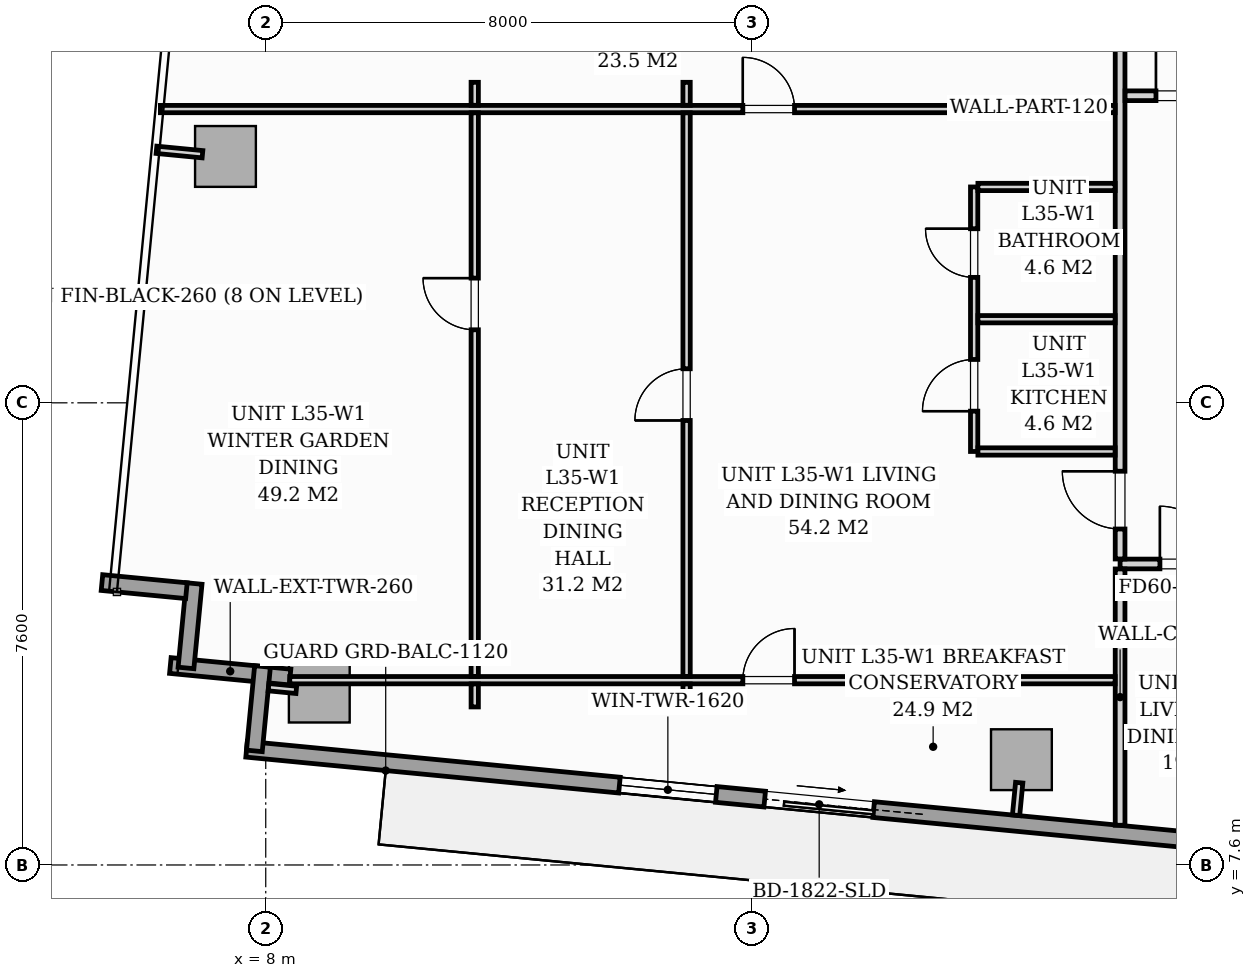
"""IFC4 building model, lengths in metres.
Left out: names, types, materials, properties, quantities, classifications, styles, units other than length and angle.
Written with IfcOpenShell. Run it as: python <this file> out.ifc"""

import sys

from ifc_helpers import new_model, si_unit, direction, frame, frame_2d, origin, origin_2d, place, context, subcontext, project, spatial, rectangle, extrude, source, transform, mapped, element, fill, save


model = new_model("IFC4")
c1 = context("Model", 3, precision=1e-05, world=origin(), true_north=direction((0.0, 1.0)))
c2 = subcontext(c1, "Body", "Model", "MODEL_VIEW")
j1 = project(units=[si_unit("LENGTHUNIT", "METRE"), si_unit("PLANEANGLEUNIT", "RADIAN")], contexts=[c1])
p1 = place(None, origin())
s1 = spatial("IfcSite", under=j1, at=p1, CompositionType="ELEMENT")
p2 = place(p1, origin())
s2 = spatial("IfcBuilding", under=s1, at=p2, CompositionType="ELEMENT")
p3 = place(p2, frame((0.0, 0.0, 124.6)))
s3 = spatial("IfcBuildingStorey", under=s2, at=p3, CompositionType="ELEMENT", Elevation=124.6)
m1 = source(origin(), c2, "Body", "SweptSolid", [
    extrude(rectangle(XDim=1.0, YDim=1.0, at=origin_2d()), origin(), (0.0, 0.0, 1.0), 3.194),
])
for number, where, z_axis, x_axis in (
    (1, (8.881, 10.443, 0.004), (0.0, 0.0, 1.0), (0.995, -0.096, 0.0)),
    (2, (20.427, 9.332, 0.004), (0.0, 0.0, 1.0), (0.995, -0.096, 0.0)),
    (3, (7.338, 19.252, 0.004), (0.0, 0.0, 1.0), (0.995, -0.096, 0.0)),
):
    element("IfcColumn", number, at=place(p3, frame(where, z_axis=z_axis, x_axis=x_axis)), inside=s3, PredefinedType="COLUMN", context=c2, shape_type="MappedRepresentation", body=[
        mapped(m1, transform((0.0, 0.0, 0.0), scale=1.0)),
    ])
p4 = place(p3, frame((8.4, 10.69, 0.0), z_axis=(0.0, 0.0, 1.0), x_axis=(-0.995391147587, 0.095898192396, 0.0)))
e4 = element("IfcWall", 4, at=p4, inside=s3, PredefinedType="STANDARD", context=c2, shape_type="SweptSolid", body=[
    extrude(rectangle(XDim=1.978, YDim=0.26, at=frame_2d((0.989, 0.0))), origin(), (0.0, 0.0, 1.0), 2.94),
])
p5 = place(p3, frame((6.688, 10.84, 0.0), z_axis=(0.0, 0.0, 1.0), x_axis=(0.09589913835, 0.995391056452, 0.0)))
e5 = element("IfcWall", 5, at=p5, inside=s3, PredefinedType="STANDARD", context=c2, shape_type="SweptSolid", body=[
    extrude(rectangle(XDim=1.395, YDim=0.26, at=frame_2d((0.698, 0.0))), origin(), (0.0, 0.0, 1.0), 2.94),
])
p6 = place(p3, frame((6.695, 12.111, 0.0), z_axis=(0.0, 0.0, 1.0), x_axis=(-0.99540614245, 0.095742423056, 0.0)))
e6 = element("IfcWall", 6, at=p6, inside=s3, PredefinedType="STANDARD", context=c2, shape_type="SweptSolid", body=[
    extrude(rectangle(XDim=1.395, YDim=0.26, at=frame_2d((0.697, 0.0))), origin(), (0.0, 0.0, 1.0), 2.94),
])
p7 = place(p3, frame((24.617, 7.873, 0.0), z_axis=(0.0, 0.0, 1.0), x_axis=(-0.995395976631, 0.095848055311, 0.0)))
e7 = element("IfcWall", 7, at=p7, inside=s3, PredefinedType="STANDARD", context=c2, shape_type="SweptSolid", body=[
    extrude(rectangle(XDim=17.01, YDim=0.26, at=frame_2d((8.505, 0.0))), origin(), (0.0, 0.0, 1.0), 2.94),
])
p8 = place(p7, frame((6.65, 0.0, 0.0)))
e8 = element("IfcOpeningElement", 8, at=p8, cuts=e7, PredefinedType="OPENING", context=c2, shape_type="SweptSolid", body=[
    extrude(rectangle(XDim=1.8, YDim=2.06, at=frame_2d((0.9, 1.03))), frame((0.0, 0.14, 0.0), z_axis=(0.0, -1.0, 0.0), x_axis=(1.0, 0.0, 0.0)), (0.0, 0.0, 1.0), 0.28),
])
p9 = place(p7, frame((9.25, 0.0, 0.65)))
e9 = element("IfcOpeningElement", 9, at=p9, cuts=e7, PredefinedType="OPENING", context=c2, shape_type="SweptSolid", body=[
    extrude(rectangle(XDim=1.6, YDim=1.5, at=frame_2d((0.8, 0.75))), frame((0.0, 0.14, 0.0), z_axis=(0.0, -1.0, 0.0), x_axis=(1.0, 0.0, 0.0)), (0.0, 0.0, 1.0), 0.28),
])
p10 = place(p3, frame((7.813, 9.476, 0.0), z_axis=(0.0, 0.0, 1.0), x_axis=(0.095915846097, 0.995389446633, 0.0)))
e10 = element("IfcWall", 10, at=p10, inside=s3, PredefinedType="STANDARD", context=c2, shape_type="SweptSolid", body=[
    extrude(rectangle(XDim=1.395, YDim=0.26, at=frame_2d((0.697, 0.0))), origin(), (0.0, 0.0, 1.0), 2.94),
])
p11 = place(p3, frame((22.05, 12.55, 0.0), z_axis=(0.0, 0.0, 1.0), x_axis=(1.0, 0.0, 0.0)))
e11 = element("IfcWall", 11, at=p11, inside=s3, PredefinedType="PARTITIONING", context=c2, shape_type="SweptSolid", body=[
    extrude(rectangle(XDim=23.83, YDim=0.16, at=frame_2d((11.915, 0.0))), origin(), (0.0, 0.0, 1.0), 2.94),
])
p12 = place(p11, frame((0.655, 0.0, 0.0)))
e12 = element("IfcOpeningElement", 12, at=p12, cuts=e11, PredefinedType="OPENING", context=c2, shape_type="SweptSolid", body=[
    extrude(rectangle(XDim=0.95, YDim=2.06, at=frame_2d((0.475, 1.03))), frame((0.0, 0.09, 0.0), z_axis=(0.0, -1.0, 0.0), x_axis=(1.0, 0.0, 0.0)), (0.0, 0.0, 1.0), 0.18),
])
p13 = place(p11, frame((12.04, 0.0, 0.0)))
e13 = element("IfcOpeningElement", 13, at=p13, cuts=e11, PredefinedType="OPENING", context=c2, shape_type="SweptSolid", body=[
    extrude(rectangle(XDim=0.95, YDim=2.06, at=frame_2d((0.475, 1.03))), frame((0.0, 0.09, 0.0), z_axis=(0.0, -1.0, 0.0), x_axis=(1.0, 0.0, 0.0)), (0.0, 0.0, 1.0), 0.18),
])
p14 = place(p3, frame((22.05, 8.253, 0.0), z_axis=(0.0, 0.0, 1.0), x_axis=(0.0, 1.0, 0.0)))
e14 = element("IfcWall", 14, at=p14, inside=s3, PredefinedType="PARTITIONING", context=c2, shape_type="SweptSolid", body=[
    extrude(rectangle(XDim=4.215, YDim=0.16, at=frame_2d((2.107, 0.0))), origin(), (0.0, 0.0, 1.0), 2.94),
])
p15 = place(p3, frame((22.05, 12.632, 0.0), z_axis=(0.0, 0.0, 1.0), x_axis=(0.0, 1.0, 0.0)))
e15 = element("IfcWall", 15, at=p15, inside=s3, PredefinedType="PARTITIONING", context=c2, shape_type="SweptSolid", body=[
    extrude(rectangle(XDim=14.785, YDim=0.16, at=frame_2d((7.393, 0.0))), origin(), (0.0, 0.0, 1.0), 2.94),
])
p16 = place(p15, frame((0.493, 0.0, 0.0)))
e16 = element("IfcOpeningElement", 16, at=p16, cuts=e15, PredefinedType="OPENING", context=c2, shape_type="SweptSolid", body=[
    extrude(rectangle(XDim=0.95, YDim=2.06, at=frame_2d((0.475, 1.03))), frame((0.0, 0.09, 0.0), z_axis=(0.0, -1.0, 0.0), x_axis=(1.0, 0.0, 0.0)), (0.0, 0.0, 1.0), 0.18),
])
p17 = place(p3, frame((19.65, 14.4, 0.0), z_axis=(0.0, 0.0, 1.0), x_axis=(0.0, 1.0, 0.0)))
e17 = element("IfcWall", 17, at=p17, inside=s3, PredefinedType="PARTITIONING", context=c2, shape_type="SweptSolid", body=[
    extrude(rectangle(XDim=4.35, YDim=0.12, at=frame_2d((2.175, 0.0))), origin(), (0.0, 0.0, 1.0), 2.94),
])
p18 = place(p17, frame((0.663, 0.0, 0.0)))
e18 = element("IfcOpeningElement", 18, at=p18, cuts=e17, PredefinedType="OPENING", context=c2, shape_type="SweptSolid", body=[
    extrude(rectangle(XDim=0.85, YDim=2.05, at=frame_2d((0.425, 1.025))), frame((0.0, 0.07, 0.0), z_axis=(0.0, -1.0, 0.0), x_axis=(1.0, 0.0, 0.0)), (0.0, 0.0, 1.0), 0.14),
])
p19 = place(p17, frame((2.863, 0.0, 0.0)))
e19 = element("IfcOpeningElement", 19, at=p19, cuts=e17, PredefinedType="OPENING", context=c2, shape_type="SweptSolid", body=[
    extrude(rectangle(XDim=0.8, YDim=2.02, at=frame_2d((0.4, 1.01))), frame((0.0, 0.07, 0.0), z_axis=(0.0, -1.0, 0.0), x_axis=(1.0, 0.0, 0.0)), (0.0, 0.0, 1.0), 0.14),
])
for number, where, z_axis, x_axis in (
    (20, (19.712, 16.575, 0.0), (0.0, 0.0, 1.0), (1.0, 0.0, 0.0)),
    (21, (19.712, 14.4, 0.0), (0.0, 0.0, 1.0), (1.0, 0.0, 0.0)),
    (22, (19.712, 18.75, 0.0), (0.0, 0.0, 1.0), (1.0, 0.0, 0.0)),
):
    element("IfcWall", number, at=place(p3, frame(where, z_axis=z_axis, x_axis=x_axis)), inside=s3, PredefinedType="PARTITIONING", context=c2, shape_type="SweptSolid", body=[
        extrude(rectangle(XDim=2.256, YDim=0.12, at=frame_2d((1.128, 0.0))), origin(), (0.0, 0.0, 1.0), 2.94),
    ])
p20 = place(p3, frame((8.395, 10.639, 0.0), z_axis=(0.0, 0.0, 1.0), x_axis=(1.0, 0.0, 0.0)))
e23 = element("IfcWall", 23, at=p20, inside=s3, PredefinedType="PARTITIONING", context=c2, shape_type="SweptSolid", body=[
    extrude(rectangle(XDim=13.573, YDim=0.12, at=frame_2d((6.787, 0.0))), origin(), (0.0, 0.0, 1.0), 2.94),
])
p21 = place(p20, frame((7.451, 0.0, 0.0)))
e24 = element("IfcOpeningElement", 24, at=p21, cuts=e23, PredefinedType="OPENING", context=c2, shape_type="SweptSolid", body=[
    extrude(rectangle(XDim=0.85, YDim=2.05, at=frame_2d((0.425, 1.025))), frame((0.0, 0.07, 0.0), z_axis=(0.0, -1.0, 0.0), x_axis=(1.0, 0.0, 0.0)), (0.0, 0.0, 1.0), 0.14),
])
p22 = place(p3, frame((6.268, 20.031, 0.0), z_axis=(0.0, 0.0, 1.0), x_axis=(1.0, 0.0, 0.0)))
e25 = element("IfcWall", 25, at=p22, inside=s3, PredefinedType="PARTITIONING", context=c2, shape_type="SweptSolid", body=[
    extrude(rectangle(XDim=15.7, YDim=0.12, at=frame_2d((7.85, 0.0))), origin(), (0.0, 0.0, 1.0), 2.94),
])
p23 = place(p22, frame((9.579, 0.0, 0.0)))
e26 = element("IfcOpeningElement", 26, at=p23, cuts=e25, PredefinedType="OPENING", context=c2, shape_type="SweptSolid", body=[
    extrude(rectangle(XDim=0.85, YDim=2.05, at=frame_2d((0.425, 1.025))), frame((0.0, 0.07, 0.0), z_axis=(0.0, -1.0, 0.0), x_axis=(1.0, 0.0, 0.0)), (0.0, 0.0, 1.0), 0.14),
])
p24 = place(p3, frame((11.437, 10.199, 0.0), z_axis=(0.0, 0.0, 1.0), x_axis=(0.0, 1.0, 0.0)))
e27 = element("IfcWall", 27, at=p24, inside=s3, PredefinedType="PARTITIONING", context=c2, shape_type="SweptSolid", body=[
    extrude(rectangle(XDim=0.378, YDim=0.12, at=frame_2d((0.189, 0.0))), origin(), (0.0, 0.0, 1.0), 2.94),
])
p25 = place(p3, frame((11.437, 10.701, 0.0), z_axis=(0.0, 0.0, 1.0), x_axis=(0.0, 1.0, 0.0)))
e28 = element("IfcWall", 28, at=p25, inside=s3, PredefinedType="PARTITIONING", context=c2, shape_type="SweptSolid", body=[
    extrude(rectangle(XDim=9.268, YDim=0.12, at=frame_2d((4.634, 0.0))), origin(), (0.0, 0.0, 1.0), 2.94),
])
p26 = place(p25, frame((5.7, 0.0, 0.0)))
e29 = element("IfcOpeningElement", 29, at=p26, cuts=e28, PredefinedType="OPENING", context=c2, shape_type="SweptSolid", body=[
    extrude(rectangle(XDim=0.85, YDim=2.05, at=frame_2d((0.425, 1.025))), frame((0.0, 0.07, 0.0), z_axis=(0.0, -1.0, 0.0), x_axis=(1.0, 0.0, 0.0)), (0.0, 0.0, 1.0), 0.14),
])
for number, where, z_axis, x_axis in (
    (30, (11.437, 20.093, 0.0), (0.0, 0.0, 1.0), (0.0, 1.0, 0.0)),
    (31, (14.921, 10.199, 0.0), (0.0, 0.0, 1.0), (0.0, 1.0, 0.0)),
):
    element("IfcWall", number, at=place(p3, frame(where, z_axis=z_axis, x_axis=x_axis)), inside=s3, PredefinedType="PARTITIONING", context=c2, shape_type="SweptSolid", body=[
        extrude(rectangle(XDim=0.378, YDim=0.12, at=frame_2d((0.189, 0.0))), origin(), (0.0, 0.0, 1.0), 2.94),
    ])
p27 = place(p3, frame((14.921, 10.701, 0.0), z_axis=(0.0, 0.0, 1.0), x_axis=(0.0, 1.0, 0.0)))
e32 = element("IfcWall", 32, at=p27, inside=s3, PredefinedType="PARTITIONING", context=c2, shape_type="SweptSolid", body=[
    extrude(rectangle(XDim=9.268, YDim=0.12, at=frame_2d((4.634, 0.0))), origin(), (0.0, 0.0, 1.0), 2.94),
])
p28 = place(p27, frame((4.209, 0.0, 0.0)))
e33 = element("IfcOpeningElement", 33, at=p28, cuts=e32, PredefinedType="OPENING", context=c2, shape_type="SweptSolid", body=[
    extrude(rectangle(XDim=0.85, YDim=2.05, at=frame_2d((0.425, 1.025))), frame((0.0, 0.07, 0.0), z_axis=(0.0, -1.0, 0.0), x_axis=(1.0, 0.0, 0.0)), (0.0, 0.0, 1.0), 0.14),
])
p29 = place(p3, frame((14.921, 20.093, 0.0), z_axis=(0.0, 0.0, 1.0), x_axis=(0.0, 1.0, 0.0)))
e34 = element("IfcWall", 34, at=p29, inside=s3, PredefinedType="PARTITIONING", context=c2, shape_type="SweptSolid", body=[
    extrude(rectangle(XDim=0.378, YDim=0.12, at=frame_2d((0.189, 0.0))), origin(), (0.0, 0.0, 1.0), 2.94),
])
p30 = place(p3, frame((22.132, 20.25, 0.0), z_axis=(0.0, 0.0, 1.0), x_axis=(1.0, 0.0, 0.0)))
e35 = element("IfcWall", 35, at=p30, inside=s3, PredefinedType="PARTITIONING", context=c2, shape_type="SweptSolid", body=[
    extrude(rectangle(XDim=1.886, YDim=0.16, at=frame_2d((0.943, 0.0))), origin(), (0.0, 0.0, 1.0), 2.94),
])
p31 = place(p30, frame((0.508, 0.0, 0.0)))
e36 = element("IfcOpeningElement", 36, at=p31, cuts=e35, PredefinedType="OPENING", context=c2, shape_type="SweptSolid", body=[
    extrude(rectangle(XDim=0.95, YDim=2.06, at=frame_2d((0.475, 1.03))), frame((0.0, 0.09, 0.0), z_axis=(0.0, -1.0, 0.0), x_axis=(1.0, 0.0, 0.0)), (0.0, 0.0, 1.0), 0.18),
])
p32 = place(p3, frame((8.502, 10.48, 0.0), z_axis=(0.0, 0.0, 1.0), x_axis=(-0.995384576284, 0.09596637586, 0.0)))
e37 = element("IfcWall", 37, at=p32, inside=s3, PredefinedType="PARTITIONING", context=c2, shape_type="SweptSolid", body=[
    extrude(rectangle(XDim=0.458, YDim=0.12, at=frame_2d((0.229, 0.0))), origin(), (0.0, 0.0, 1.0), 2.94),
])
p33 = place(p3, frame((20.391, 8.953, 0.0), z_axis=(0.0, 0.0, 1.0), x_axis=(-0.096222656154, -0.995359834654, 0.0)))
e38 = element("IfcWall", 38, at=p33, inside=s3, PredefinedType="PARTITIONING", context=c2, shape_type="SweptSolid", body=[
    extrude(rectangle(XDim=0.538, YDim=0.12, at=frame_2d((0.269, 0.0))), origin(), (0.0, 0.0, 1.0), 2.94),
])
p34 = place(p3, frame((6.959, 19.288, 0.0), z_axis=(0.0, 0.0, 1.0), x_axis=(-0.995377786728, 0.096036772582, 0.0)))
e39 = element("IfcWall", 39, at=p34, inside=s3, PredefinedType="PARTITIONING", context=c2, shape_type="SweptSolid", body=[
    extrude(rectangle(XDim=0.76, YDim=0.12, at=frame_2d((0.38, 0.0))), origin(), (0.0, 0.0, 1.0), 2.94),
])
m2 = source(origin(), c2, "Body", "SweptSolid", [
    extrude(rectangle(XDim=1.8, YDim=2.06, at=frame_2d((0.9, 1.03))), frame((0.0, 0.025, 0.0), z_axis=(0.0, -1.0, 0.0), x_axis=(1.0, 0.0, 0.0)), (0.0, 0.0, 1.0), 0.05),
])
p35 = place(p8, origin())
e40 = element("IfcDoor", 40, at=p35, inside=s3, OperationType="SLIDING_TO_LEFT", PredefinedType="DOOR", context=c2, shape_type="MappedRepresentation", body=[
    mapped(m2, transform((0.0, 0.0, 0.0), scale=1.0)),
])
fill(e8, e40)
m3 = source(origin(), c2, "Body", "SweptSolid", [
    extrude(rectangle(XDim=1.6, YDim=1.5, at=frame_2d((0.8, 0.75))), frame((0.0, 0.03, 0.0), z_axis=(0.0, -1.0, 0.0), x_axis=(1.0, 0.0, 0.0)), (0.0, 0.0, 1.0), 0.06),
])
p36 = place(p9, origin())
e41 = element("IfcWindow", 41, at=p36, inside=s3, PartitioningType="SINGLE_PANEL", PredefinedType="WINDOW", context=c2, shape_type="MappedRepresentation", body=[
    mapped(m3, transform((0.0, 0.0, 0.0), scale=1.0)),
])
fill(e9, e41)
m4 = source(origin(), c2, "Body", "SweptSolid", [
    extrude(rectangle(XDim=0.95, YDim=2.06, at=frame_2d((0.475, 1.03))), frame((0.0, 0.025, 0.0), z_axis=(0.0, -1.0, 0.0), x_axis=(1.0, 0.0, 0.0)), (0.0, 0.0, 1.0), 0.05),
])
p37 = place(p12, origin())
e42 = element("IfcDoor", 42, at=p37, inside=s3, OperationType="SINGLE_SWING_LEFT", PredefinedType="DOOR", context=c2, shape_type="MappedRepresentation", body=[
    mapped(m4, transform((0.0, 0.0, 0.0), scale=1.0)),
])
fill(e12, e42)
p38 = place(p16, origin())
e43 = element("IfcDoor", 43, at=p38, inside=s3, OperationType="SINGLE_SWING_RIGHT", PredefinedType="DOOR", context=c2, shape_type="MappedRepresentation", body=[
    mapped(m4, transform((0.0, 0.0, 0.0), scale=1.0)),
])
fill(e16, e43)
m5 = source(origin(), c2, "Body", "SweptSolid", [
    extrude(rectangle(XDim=0.85, YDim=2.05, at=frame_2d((0.425, 1.025))), frame((0.0, 0.025, 0.0), z_axis=(0.0, -1.0, 0.0), x_axis=(1.0, 0.0, 0.0)), (0.0, 0.0, 1.0), 0.05),
])
p39 = place(p18, origin())
e44 = element("IfcDoor", 44, at=p39, inside=s3, OperationType="SINGLE_SWING_LEFT", PredefinedType="DOOR", context=c2, shape_type="MappedRepresentation", body=[
    mapped(m5, transform((0.0, 0.0, 0.0), scale=1.0)),
])
fill(e18, e44)
m6 = source(origin(), c2, "Body", "SweptSolid", [
    extrude(rectangle(XDim=0.8, YDim=2.02, at=frame_2d((0.4, 1.01))), frame((0.0, 0.025, 0.0), z_axis=(0.0, -1.0, 0.0), x_axis=(1.0, 0.0, 0.0)), (0.0, 0.0, 1.0), 0.05),
])
p40 = place(p19, origin())
e45 = element("IfcDoor", 45, at=p40, inside=s3, OperationType="SINGLE_SWING_RIGHT", PredefinedType="DOOR", context=c2, shape_type="MappedRepresentation", body=[
    mapped(m6, transform((0.0, 0.0, 0.0), scale=1.0)),
])
fill(e19, e45)
p41 = place(p21, origin())
e46 = element("IfcDoor", 46, at=p41, inside=s3, OperationType="SINGLE_SWING_RIGHT", PredefinedType="DOOR", context=c2, shape_type="MappedRepresentation", body=[
    mapped(m5, transform((0.0, 0.0, 0.0), scale=1.0)),
])
fill(e24, e46)
p42 = place(p23, origin())
e47 = element("IfcDoor", 47, at=p42, inside=s3, OperationType="SINGLE_SWING_LEFT", PredefinedType="DOOR", context=c2, shape_type="MappedRepresentation", body=[
    mapped(m5, transform((0.0, 0.0, 0.0), scale=1.0)),
])
fill(e26, e47)
p43 = place(p26, origin())
e48 = element("IfcDoor", 48, at=p43, inside=s3, OperationType="SINGLE_SWING_RIGHT", PredefinedType="DOOR", context=c2, shape_type="MappedRepresentation", body=[
    mapped(m5, transform((0.0, 0.0, 0.0), scale=1.0)),
])
fill(e29, e48)
p44 = place(p28, origin())
e49 = element("IfcDoor", 49, at=p44, inside=s3, OperationType="SINGLE_SWING_LEFT", PredefinedType="DOOR", context=c2, shape_type="MappedRepresentation", body=[
    mapped(m5, transform((0.0, 0.0, 0.0), scale=1.0)),
])
fill(e33, e49)
p45 = place(p31, origin())
e50 = element("IfcDoor", 50, at=p45, inside=s3, OperationType="SINGLE_SWING_LEFT", PredefinedType="DOOR", context=c2, shape_type="MappedRepresentation", body=[
    mapped(m4, transform((0.0, 0.0, 0.0), scale=1.0)),
])
fill(e36, e50)
save(model, sys.argv[1])
